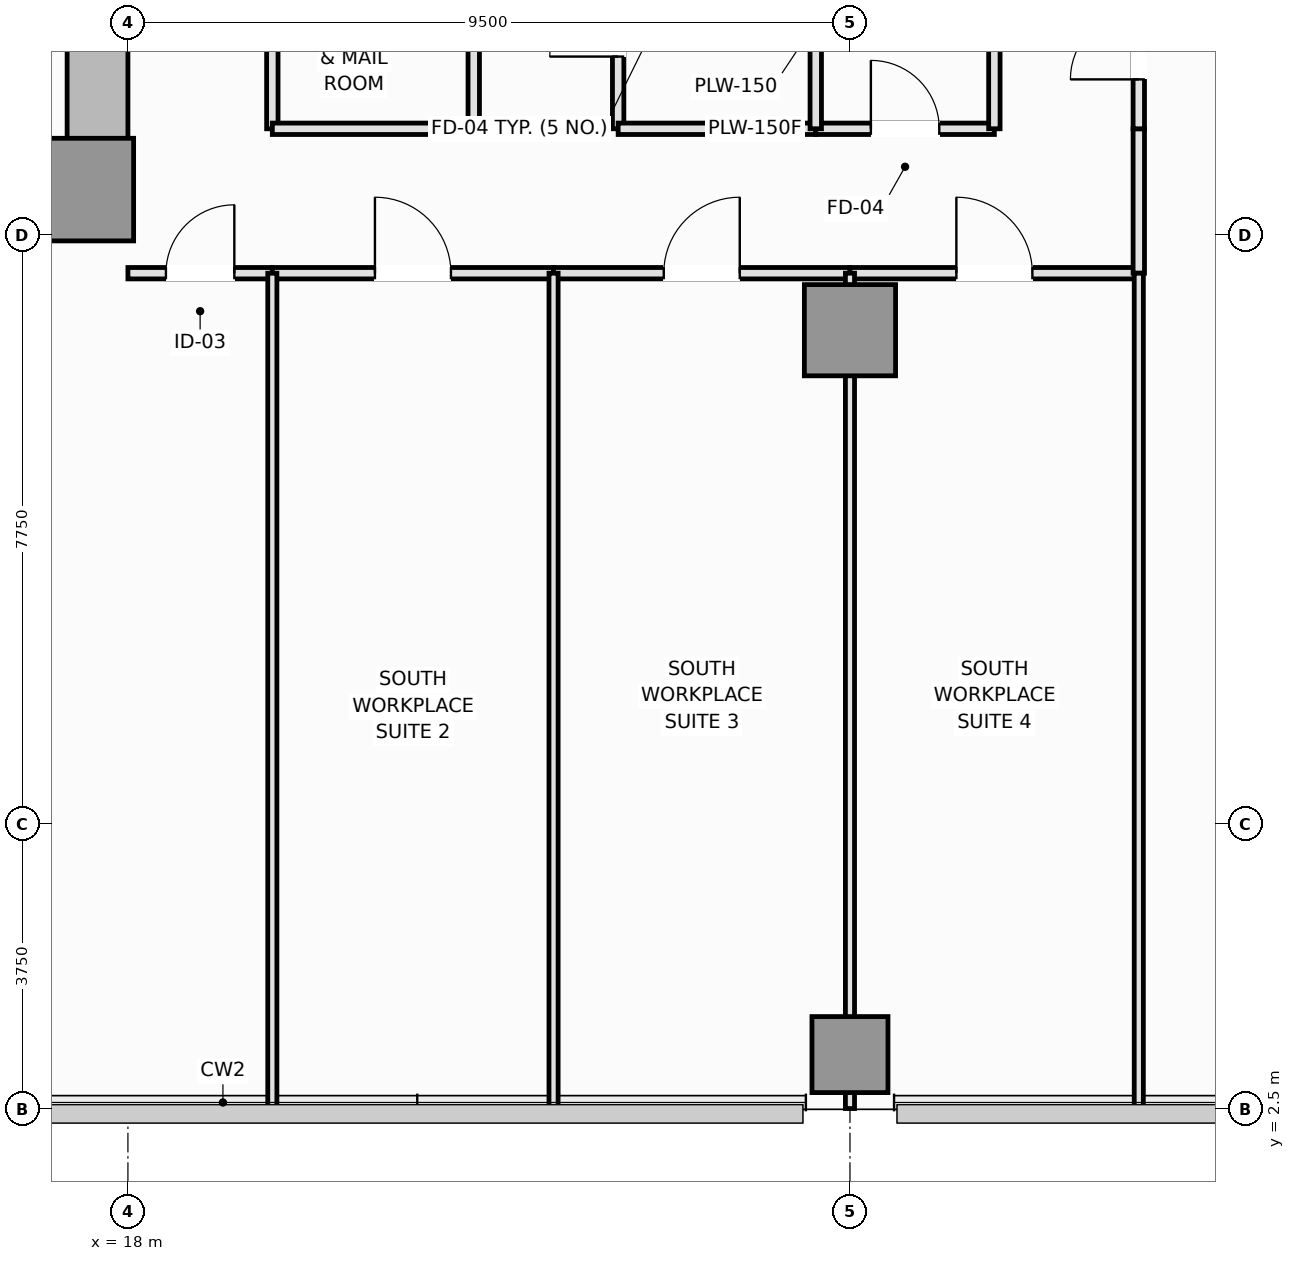
"""IFC4 building model, lengths in metres.
Left out: names, types, materials, properties, quantities, classifications, styles, units other than length and angle.
Written with IfcOpenShell. Run it as: python <this file> out.ifc"""

import sys

from ifc_helpers import new_model, si_unit, direction, frame, frame_2d, origin, origin_2d, place, context, subcontext, project, spatial, rectangle, extrude, element, fill, save


model = new_model("IFC4")
c1 = context("Model", 3, precision=1e-05, world=origin(), true_north=direction((0.0, 1.0)))
c2 = subcontext(c1, "Body", "Model", "MODEL_VIEW")
j1 = project(units=[si_unit("LENGTHUNIT", "METRE"), si_unit("PLANEANGLEUNIT", "RADIAN")], contexts=[c1])
p1 = place(None, origin())
s1 = spatial("IfcSite", under=j1, at=p1, CompositionType="ELEMENT")
p2 = place(p1, origin())
s2 = spatial("IfcBuilding", under=s1, at=p2, CompositionType="ELEMENT")
p3 = place(p2, frame((0.0, 0.0, 85.95)))
s3 = spatial("IfcBuildingStorey", under=s2, at=p3, CompositionType="ELEMENT", Elevation=85.95)
p4 = place(p3, frame((4.5, 14.4, 0.0), z_axis=(0.0, 0.0, 1.0), x_axis=(1.0, 0.0, 0.0)))
e1 = element("IfcWall", 1, at=p4, inside=s3, PredefinedType="SHEAR", context=c2, shape_type="SweptSolid", body=[
    extrude(rectangle(XDim=13.5, YDim=0.8, at=frame_2d((6.75, 0.0))), origin(), (0.0, 0.0, 1.0), 3.55),
])
p5 = place(p3, frame((17.6, 14.8, 0.0), z_axis=(0.0, 0.0, 1.0), x_axis=(0.0, 1.0, 0.0)))
e2 = element("IfcWall", 2, at=p5, inside=s3, PredefinedType="SHEAR", context=c2, shape_type="SweptSolid", body=[
    extrude(rectangle(XDim=8.65, YDim=0.8, at=frame_2d((4.325, 0.0))), origin(), (0.0, 0.0, 1.0), 3.55),
])
p6 = place(p5, frame((4.1, 0.0, 0.0)))
e3 = element("IfcOpeningElement", 3, at=p6, cuts=e2, PredefinedType="OPENING", context=c2, shape_type="SweptSolid", body=[
    extrude(rectangle(XDim=1.1, YDim=2.15, at=frame_2d((0.55, 1.075))), frame((0.0, 0.41, 0.0), z_axis=(0.0, -1.0, 0.0), x_axis=(1.0, 0.0, 0.0)), (0.0, 0.0, 1.0), 0.82),
])
p7 = place(p3, frame((17.4, 14.6, 0.0), z_axis=(0.0, 0.0, 1.0), x_axis=(1.0, 0.0, 0.0)))
e4 = element("IfcColumn", 4, at=p7, inside=s3, PredefinedType="PILASTER", context=c2, shape_type="SweptSolid", body=[
    extrude(rectangle(XDim=1.35, YDim=1.35, at=origin_2d()), origin(), (0.0, 0.0, 1.0), 3.55),
])
p8 = place(p3, frame((27.5, 12.75, 0.0), z_axis=(0.0, 0.0, 1.0), x_axis=(1.0, 0.0, 0.0)))
e5 = element("IfcColumn", 5, at=p8, inside=s3, PredefinedType="COLUMN", context=c2, shape_type="SweptSolid", body=[
    extrude(rectangle(XDim=1.2, YDim=1.2, at=origin_2d()), origin(), (0.0, 0.0, 1.0), 3.55),
])
p9 = place(p3, frame((27.5, 3.22, 0.0), z_axis=(0.0, 0.0, 1.0), x_axis=(1.0, 0.0, 0.0)))
e6 = element("IfcColumn", 6, at=p9, inside=s3, PredefinedType="COLUMN", context=c2, shape_type="SweptSolid", body=[
    extrude(rectangle(XDim=1.0, YDim=1.0, at=origin_2d()), origin(), (0.0, 0.0, 1.0), 3.55),
])
p10 = place(p3, frame((22.55, 15.4, 0.0), z_axis=(0.0, 0.0, 1.0), x_axis=(0.0, 1.0, 0.0)))
e7 = element("IfcWall", 7, at=p10, inside=s3, PredefinedType="PARTITIONING", context=c2, shape_type="SweptSolid", body=[
    extrude(rectangle(XDim=5.35, YDim=0.15, at=frame_2d((2.675, 0.0))), origin(), (0.0, 0.0, 1.0), 3.01),
])
p11 = place(p10, frame((2.175, 0.0, 0.0)))
e8 = element("IfcOpeningElement", 8, at=p11, cuts=e7, PredefinedType="OPENING", context=c2, shape_type="SweptSolid", body=[
    extrude(rectangle(XDim=1.0, YDim=2.15, at=frame_2d((0.5, 1.075))), frame((0.0, 0.085, 0.0), z_axis=(0.0, -1.0, 0.0), x_axis=(1.0, 0.0, 0.0)), (0.0, 0.0, 1.0), 0.17),
])
p12 = place(p3, frame((24.45, 15.4, 0.0), z_axis=(0.0, 0.0, 1.0), x_axis=(0.0, 1.0, 0.0)))
e9 = element("IfcWall", 9, at=p12, inside=s3, PredefinedType="PLUMBINGWALL", context=c2, shape_type="SweptSolid", body=[
    extrude(rectangle(XDim=2.8, YDim=0.15, at=frame_2d((1.4, 0.0))), origin(), (0.0, 0.0, 1.0), 3.37),
])
p13 = place(p12, frame((0.95, 0.0, 0.0)))
e10 = element("IfcOpeningElement", 10, at=p13, cuts=e9, PredefinedType="OPENING", context=c2, shape_type="SweptSolid", body=[
    extrude(rectangle(XDim=0.9, YDim=2.1, at=frame_2d((0.45, 1.05))), frame((0.0, 0.085, 0.0), z_axis=(0.0, -1.0, 0.0), x_axis=(1.0, 0.0, 0.0)), (0.0, 0.0, 1.0), 0.17),
])
p14 = place(p3, frame((19.9, 15.4, 0.0), z_axis=(0.0, 0.0, 1.0), x_axis=(0.0, 1.0, 0.0)))
e11 = element("IfcWall", 11, at=p14, inside=s3, PredefinedType="PARTITIONING", context=c2, shape_type="SweptSolid", body=[
    extrude(rectangle(XDim=5.35, YDim=0.15, at=frame_2d((2.675, 0.0))), origin(), (0.0, 0.0, 1.0), 3.37),
])
p15 = place(p3, frame((19.9, 15.4, 0.0), z_axis=(0.0, 0.0, 1.0), x_axis=(1.0, 0.0, 0.0)))
e12 = element("IfcWall", 12, at=p15, inside=s3, PredefinedType="PARTITIONING", context=c2, shape_type="SweptSolid", body=[
    extrude(rectangle(XDim=2.65, YDim=0.15, at=frame_2d((1.325, 0.0))), origin(), (0.0, 0.0, 1.0), 3.37),
])
p16 = place(p3, frame((24.45, 15.4, 0.0), z_axis=(0.0, 0.0, 1.0), x_axis=(1.0, 0.0, 0.0)))
e13 = element("IfcWall", 13, at=p16, inside=s3, PredefinedType="PLUMBINGWALL", context=c2, shape_type="SweptSolid", body=[
    extrude(rectangle(XDim=2.6, YDim=0.15, at=frame_2d((1.3, 0.0))), origin(), (0.0, 0.0, 1.0), 3.37),
])
p17 = place(p3, frame((27.05, 15.4, 0.0), z_axis=(0.0, 0.0, 1.0), x_axis=(1.0, 0.0, 0.0)))
e14 = element("IfcWall", 14, at=p17, inside=s3, PredefinedType="PLUMBINGWALL", context=c2, shape_type="SweptSolid", body=[
    extrude(rectangle(XDim=2.35, YDim=0.15, at=frame_2d((1.175, 0.0))), origin(), (0.0, 0.0, 1.0), 3.37),
])
p18 = place(p17, frame((0.725, 0.0, 0.0)))
e15 = element("IfcOpeningElement", 15, at=p18, cuts=e14, PredefinedType="OPENING", context=c2, shape_type="SweptSolid", body=[
    extrude(rectangle(XDim=0.9, YDim=2.1, at=frame_2d((0.45, 1.05))), frame((0.0, 0.085, 0.0), z_axis=(0.0, -1.0, 0.0), x_axis=(1.0, 0.0, 0.0)), (0.0, 0.0, 1.0), 0.17),
])
p19 = place(p3, frame((18.0, 13.5, 0.0), z_axis=(0.0, 0.0, 1.0), x_axis=(1.0, 0.0, 0.0)))
e16 = element("IfcWall", 16, at=p19, inside=s3, PredefinedType="PARTITIONING", context=c2, shape_type="SweptSolid", body=[
    extrude(rectangle(XDim=1.9, YDim=0.15, at=frame_2d((0.95, 0.0))), origin(), (0.0, 0.0, 1.0), 3.37),
])
p20 = place(p19, frame((0.5, 0.0, 0.0)))
e17 = element("IfcOpeningElement", 17, at=p20, cuts=e16, PredefinedType="OPENING", context=c2, shape_type="SweptSolid", body=[
    extrude(rectangle(XDim=0.9, YDim=2.1, at=frame_2d((0.45, 1.05))), frame((0.0, 0.085, 0.0), z_axis=(0.0, -1.0, 0.0), x_axis=(1.0, 0.0, 0.0)), (0.0, 0.0, 1.0), 0.17),
])
p21 = place(p3, frame((19.9, 13.5, 0.0), z_axis=(0.0, 0.0, 1.0), x_axis=(1.0, 0.0, 0.0)))
e18 = element("IfcWall", 18, at=p21, inside=s3, PredefinedType="PARTITIONING", context=c2, shape_type="SweptSolid", body=[
    extrude(rectangle(XDim=3.7, YDim=0.15, at=frame_2d((1.85, 0.0))), origin(), (0.0, 0.0, 1.0), 3.37),
])
p22 = place(p21, frame((1.35, 0.0, 0.0)))
e19 = element("IfcOpeningElement", 19, at=p22, cuts=e18, PredefinedType="OPENING", context=c2, shape_type="SweptSolid", body=[
    extrude(rectangle(XDim=1.0, YDim=2.15, at=frame_2d((0.5, 1.075))), frame((0.0, 0.085, 0.0), z_axis=(0.0, -1.0, 0.0), x_axis=(1.0, 0.0, 0.0)), (0.0, 0.0, 1.0), 0.17),
])
p23 = place(p3, frame((23.6, 13.5, 0.0), z_axis=(0.0, 0.0, 1.0), x_axis=(1.0, 0.0, 0.0)))
e20 = element("IfcWall", 20, at=p23, inside=s3, PredefinedType="PARTITIONING", context=c2, shape_type="SweptSolid", body=[
    extrude(rectangle(XDim=3.9, YDim=0.15, at=frame_2d((1.95, 0.0))), origin(), (0.0, 0.0, 1.0), 3.37),
])
p24 = place(p23, frame((1.45, 0.0, 0.0)))
e21 = element("IfcOpeningElement", 21, at=p24, cuts=e20, PredefinedType="OPENING", context=c2, shape_type="SweptSolid", body=[
    extrude(rectangle(XDim=1.0, YDim=2.15, at=frame_2d((0.5, 1.075))), frame((0.0, 0.085, 0.0), z_axis=(0.0, -1.0, 0.0), x_axis=(1.0, 0.0, 0.0)), (0.0, 0.0, 1.0), 0.17),
])
p25 = place(p3, frame((27.5, 13.5, 0.0), z_axis=(0.0, 0.0, 1.0), x_axis=(1.0, 0.0, 0.0)))
e22 = element("IfcWall", 22, at=p25, inside=s3, PredefinedType="PARTITIONING", context=c2, shape_type="SweptSolid", body=[
    extrude(rectangle(XDim=3.8, YDim=0.15, at=frame_2d((1.9, 0.0))), origin(), (0.0, 0.0, 1.0), 3.37),
])
p26 = place(p25, frame((1.4, 0.0, 0.0)))
e23 = element("IfcOpeningElement", 23, at=p26, cuts=e22, PredefinedType="OPENING", context=c2, shape_type="SweptSolid", body=[
    extrude(rectangle(XDim=1.0, YDim=2.15, at=frame_2d((0.5, 1.075))), frame((0.0, 0.085, 0.0), z_axis=(0.0, -1.0, 0.0), x_axis=(1.0, 0.0, 0.0)), (0.0, 0.0, 1.0), 0.17),
])
p27 = place(p3, frame((31.3, 13.5, 0.0), z_axis=(0.0, 0.0, 1.0), x_axis=(0.0, 1.0, 0.0)))
e24 = element("IfcWall", 24, at=p27, inside=s3, PredefinedType="PARTITIONING", context=c2, shape_type="SweptSolid", body=[
    extrude(rectangle(XDim=1.9, YDim=0.15, at=frame_2d((0.95, 0.0))), origin(), (0.0, 0.0, 1.0), 3.37),
])
p28 = place(p3, frame((29.4, 15.4, 0.0), z_axis=(0.0, 0.0, 1.0), x_axis=(0.0, 1.0, 0.0)))
e25 = element("IfcWall", 25, at=p28, inside=s3, PredefinedType="PLUMBINGWALL", context=c2, shape_type="SweptSolid", body=[
    extrude(rectangle(XDim=2.8, YDim=0.15, at=frame_2d((1.4, 0.0))), origin(), (0.0, 0.0, 1.0), 3.37),
])
p29 = place(p3, frame((31.3, 15.4, 0.0), z_axis=(0.0, 0.0, 1.0), x_axis=(0.0, 1.0, 0.0)))
e26 = element("IfcWall", 26, at=p29, inside=s3, PredefinedType="PARTITIONING", context=c2, shape_type="SweptSolid", body=[
    extrude(rectangle(XDim=3.1, YDim=0.15, at=frame_2d((1.55, 0.0))), origin(), (0.0, 0.0, 1.0), 3.37),
])
p30 = place(p29, frame((0.65, 0.0, 0.0)))
e27 = element("IfcOpeningElement", 27, at=p30, cuts=e26, PredefinedType="OPENING", context=c2, shape_type="SweptSolid", body=[
    extrude(rectangle(XDim=1.8, YDim=2.2, at=frame_2d((0.9, 1.1))), frame((0.0, 0.085, 0.0), z_axis=(0.0, -1.0, 0.0), x_axis=(1.0, 0.0, 0.0)), (0.0, 0.0, 1.0), 0.17),
])
p31 = place(p3, frame((27.05, 15.4, 0.0), z_axis=(0.0, 0.0, 1.0), x_axis=(0.0, 1.0, 0.0)))
e28 = element("IfcWall", 28, at=p31, inside=s3, PredefinedType="PLUMBINGWALL", context=c2, shape_type="SweptSolid", body=[
    extrude(rectangle(XDim=2.8, YDim=0.15, at=frame_2d((1.4, 0.0))), origin(), (0.0, 0.0, 1.0), 3.37),
])
for number, where, z_axis, x_axis in (
    (29, (19.9, 2.51, 0.0), (0.0, 0.0, 1.0), (0.0, 1.0, 0.0)),
    (30, (23.6, 2.51, 0.0), (0.0, 0.0, 1.0), (0.0, 1.0, 0.0)),
):
    element("IfcWall", number, at=place(p3, frame(where, z_axis=z_axis, x_axis=x_axis)), inside=s3, PredefinedType="PARTITIONING", context=c2, shape_type="SweptSolid", body=[
        extrude(rectangle(XDim=10.99, YDim=0.12, at=frame_2d((5.495, 0.0))), origin(), (0.0, 0.0, 1.0), 3.37),
    ])
p32 = place(p3, frame((27.5, 2.51, 0.0), z_axis=(0.0, 0.0, 1.0), x_axis=(0.0, 1.0, 0.0)))
e31 = element("IfcWall", 31, at=p32, inside=s3, PredefinedType="PARTITIONING", context=c2, shape_type="SweptSolid", body=[
    extrude(rectangle(XDim=10.99, YDim=0.12, at=frame_2d((5.495, 0.0))), origin(), (0.0, 0.0, 1.0), 2.82),
])
p33 = place(p3, frame((31.3, 2.51, 0.0), z_axis=(0.0, 0.0, 1.0), x_axis=(0.0, 1.0, 0.0)))
e32 = element("IfcWall", 32, at=p33, inside=s3, PredefinedType="PARTITIONING", context=c2, shape_type="SweptSolid", body=[
    extrude(rectangle(XDim=10.99, YDim=0.12, at=frame_2d((5.495, 0.0))), origin(), (0.0, 0.0, 1.0), 3.37),
])
p34 = place(p13, origin())
e33 = element("IfcDoor", 33, at=p34, inside=s3, OperationType="SINGLE_SWING_LEFT", PredefinedType="DOOR", context=c2, shape_type="SweptSolid", body=[
    extrude(rectangle(XDim=0.9, YDim=2.1, at=frame_2d((0.45, 1.05))), frame((0.0, 0.025, 0.0), z_axis=(0.0, -1.0, 0.0), x_axis=(1.0, 0.0, 0.0)), (0.0, 0.0, 1.0), 0.05),
])
fill(e10, e33)
p35 = place(p18, origin())
e34 = element("IfcDoor", 34, at=p35, inside=s3, OperationType="SINGLE_SWING_LEFT", PredefinedType="DOOR", context=c2, shape_type="SweptSolid", body=[
    extrude(rectangle(XDim=0.9, YDim=2.1, at=frame_2d((0.45, 1.05))), frame((0.0, 0.025, 0.0), z_axis=(0.0, -1.0, 0.0), x_axis=(1.0, 0.0, 0.0)), (0.0, 0.0, 1.0), 0.05),
])
fill(e15, e34)
p36 = place(p20, origin())
e35 = element("IfcDoor", 35, at=p36, inside=s3, OperationType="SINGLE_SWING_RIGHT", PredefinedType="DOOR", context=c2, shape_type="SweptSolid", body=[
    extrude(rectangle(XDim=0.9, YDim=2.1, at=frame_2d((0.45, 1.05))), frame((0.0, 0.025, 0.0), z_axis=(0.0, -1.0, 0.0), x_axis=(1.0, 0.0, 0.0)), (0.0, 0.0, 1.0), 0.05),
])
fill(e17, e35)
p37 = place(p22, origin())
e36 = element("IfcDoor", 36, at=p37, inside=s3, OperationType="SINGLE_SWING_LEFT", PredefinedType="DOOR", context=c2, shape_type="SweptSolid", body=[
    extrude(rectangle(XDim=1.0, YDim=2.15, at=frame_2d((0.5, 1.075))), frame((0.0, 0.025, 0.0), z_axis=(0.0, -1.0, 0.0), x_axis=(1.0, 0.0, 0.0)), (0.0, 0.0, 1.0), 0.05),
])
fill(e19, e36)
p38 = place(p24, origin())
e37 = element("IfcDoor", 37, at=p38, inside=s3, OperationType="SINGLE_SWING_RIGHT", PredefinedType="DOOR", context=c2, shape_type="SweptSolid", body=[
    extrude(rectangle(XDim=1.0, YDim=2.15, at=frame_2d((0.5, 1.075))), frame((0.0, 0.025, 0.0), z_axis=(0.0, -1.0, 0.0), x_axis=(1.0, 0.0, 0.0)), (0.0, 0.0, 1.0), 0.05),
])
fill(e21, e37)
p39 = place(p26, origin())
e38 = element("IfcDoor", 38, at=p39, inside=s3, OperationType="SINGLE_SWING_LEFT", PredefinedType="DOOR", context=c2, shape_type="SweptSolid", body=[
    extrude(rectangle(XDim=1.0, YDim=2.15, at=frame_2d((0.5, 1.075))), frame((0.0, 0.025, 0.0), z_axis=(0.0, -1.0, 0.0), x_axis=(1.0, 0.0, 0.0)), (0.0, 0.0, 1.0), 0.05),
])
fill(e23, e38)
p40 = place(p30, origin())
e39 = element("IfcDoor", 39, at=p40, inside=s3, OperationType="DOUBLE_DOOR_SINGLE_SWING", PredefinedType="DOOR", context=c2, shape_type="SweptSolid", body=[
    extrude(rectangle(XDim=1.8, YDim=2.2, at=frame_2d((0.9, 1.1))), frame((0.0, 0.025, 0.0), z_axis=(0.0, -1.0, 0.0), x_axis=(1.0, 0.0, 0.0)), (0.0, 0.0, 1.0), 0.05),
])
fill(e27, e39)
save(model, sys.argv[1])
